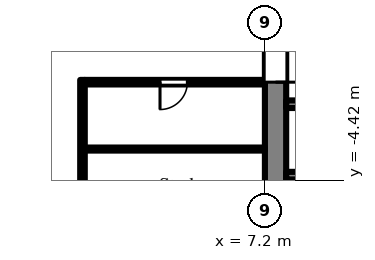
"""IFC4 building model, lengths in metres.
Left out: names, types, materials, properties, quantities, classifications, styles, units other than length and angle.
Written with IfcOpenShell. Run it as: python <this file> out.ifc"""

import sys

from ifc_helpers import new_model, si_unit, direction, frame, frame_2d, origin, place, context, subcontext, project, spatial, rectangle, extrude, element, fill, save


model = new_model("IFC4")
c1 = context("Model", 3, precision=1e-05, world=origin(), true_north=direction((0.0, 1.0)))
c2 = subcontext(c1, "Body", "Model", "MODEL_VIEW")
j1 = project(units=[si_unit("LENGTHUNIT", "METRE"), si_unit("PLANEANGLEUNIT", "RADIAN")], contexts=[c1])
p1 = place(None, origin())
s1 = spatial("IfcSite", under=j1, at=p1, CompositionType="ELEMENT")
p2 = place(p1, origin())
s2 = spatial("IfcBuilding", under=s1, at=p2, CompositionType="ELEMENT")
p3 = place(p2, frame((0.0, 0.0, 44.7)))
s3 = spatial("IfcBuildingStorey", under=s2, at=p3, CompositionType="ELEMENT", Elevation=44.7)
p4 = place(p3, frame((7.55, -7.2, 0.0), z_axis=(0.0, 0.0, 1.0), x_axis=(0.0, 1.0, 0.0)))
e1 = element("IfcWall", 1, at=p4, inside=s3, PredefinedType="SHEAR", context=c2, shape_type="SweptSolid", body=[
    extrude(rectangle(XDim=14.4, YDim=0.7, at=frame_2d((7.2, 0.0))), origin(), (0.0, 0.0, 1.0), 2.575),
])
p5 = place(p4, frame((6.0, 0.0, 0.0)))
e2 = element("IfcOpeningElement", 2, at=p5, cuts=e1, PredefinedType="OPENING", context=c2, shape_type="SweptSolid", body=[
    extrude(rectangle(XDim=2.4, YDim=2.2, at=frame_2d((1.2, 1.1))), frame((0.0, 0.36, 0.0), z_axis=(0.0, -1.0, 0.0), x_axis=(1.0, 0.0, 0.0)), (0.0, 0.0, 1.0), 0.72),
])
p6 = place(p3, frame((7.9, -1.925, 0.0), z_axis=(0.0, 0.0, 1.0), x_axis=(1.0, 0.0, 0.0)))
e3 = element("IfcWall", 3, at=p6, inside=s3, PredefinedType="SHEAR", context=c2, shape_type="SweptSolid", body=[
    extrude(rectangle(XDim=12.95, YDim=0.25, at=frame_2d((6.475, 0.0))), origin(), (0.0, 0.0, 1.0), 2.575),
])
p7 = place(p6, frame((4.825, 0.0, 0.0)))
e4 = element("IfcOpeningElement", 4, at=p7, cuts=e3, PredefinedType="OPENING", context=c2, shape_type="SweptSolid", body=[
    extrude(rectangle(XDim=1.1, YDim=2.1, at=frame_2d((0.55, 1.05))), frame((0.0, 0.135, 0.0), z_axis=(0.0, -1.0, 0.0), x_axis=(1.0, 0.0, 0.0)), (0.0, 0.0, 1.0), 0.27),
])
p8 = place(p6, frame((7.025, 0.0, 0.0)))
e5 = element("IfcOpeningElement", 5, at=p8, cuts=e3, PredefinedType="OPENING", context=c2, shape_type="SweptSolid", body=[
    extrude(rectangle(XDim=1.1, YDim=2.1, at=frame_2d((0.55, 1.05))), frame((0.0, 0.135, 0.0), z_axis=(0.0, -1.0, 0.0), x_axis=(1.0, 0.0, 0.0)), (0.0, 0.0, 1.0), 0.27),
])
p9 = place(p6, frame((9.225, 0.0, 0.0)))
e6 = element("IfcOpeningElement", 6, at=p9, cuts=e3, PredefinedType="OPENING", context=c2, shape_type="SweptSolid", body=[
    extrude(rectangle(XDim=1.1, YDim=2.1, at=frame_2d((0.55, 1.05))), frame((0.0, 0.135, 0.0), z_axis=(0.0, -1.0, 0.0), x_axis=(1.0, 0.0, 0.0)), (0.0, 0.0, 1.0), 0.27),
])
p10 = place(p6, frame((0.525, 0.0, 0.0)))
e7 = element("IfcOpeningElement", 7, at=p10, cuts=e3, PredefinedType="OPENING", context=c2, shape_type="SweptSolid", body=[
    extrude(rectangle(XDim=0.9, YDim=2.1, at=frame_2d((0.45, 1.05))), frame((0.0, 0.135, 0.0), z_axis=(0.0, -1.0, 0.0), x_axis=(1.0, 0.0, 0.0)), (0.0, 0.0, 1.0), 0.27),
])
p11 = place(p6, frame((2.625, 0.0, 0.0)))
e8 = element("IfcOpeningElement", 8, at=p11, cuts=e3, PredefinedType="OPENING", context=c2, shape_type="SweptSolid", body=[
    extrude(rectangle(XDim=1.1, YDim=2.1, at=frame_2d((0.55, 1.05))), frame((0.0, 0.135, 0.0), z_axis=(0.0, -1.0, 0.0), x_axis=(1.0, 0.0, 0.0)), (0.0, 0.0, 1.0), 0.27),
])
p12 = place(p3, frame((7.9, -4.275, 0.0), z_axis=(0.0, 0.0, 1.0), x_axis=(1.0, 0.0, 0.0)))
e9 = element("IfcWall", 9, at=p12, inside=s3, PredefinedType="SHEAR", context=c2, shape_type="SweptSolid", body=[
    extrude(rectangle(XDim=1.95, YDim=0.25, at=frame_2d((0.975, 0.0))), origin(), (0.0, 0.0, 1.0), 2.575),
])
p13 = place(p3, frame((1.2, -36.5, 0.0), z_axis=(0.0, 0.0, 1.0), x_axis=(0.0, 1.0, 0.0)))
e10 = element("IfcWall", 10, at=p13, inside=s3, PredefinedType="PARTITIONING", context=c2, shape_type="SweptSolid", body=[
    extrude(rectangle(XDim=35.375, YDim=0.15, at=frame_2d((17.688, 0.0))), origin(), (0.0, 0.0, 1.0), 2.575),
])
p14 = place(p13, frame((30.75, 0.0, 0.0)))
e11 = element("IfcOpeningElement", 11, at=p14, cuts=e10, PredefinedType="OPENING", context=c2, shape_type="SweptSolid", body=[
    extrude(rectangle(XDim=0.9, YDim=2.1, at=frame_2d((0.45, 1.05))), frame((0.0, 0.085, 0.0), z_axis=(0.0, -1.0, 0.0), x_axis=(1.0, 0.0, 0.0)), (0.0, 0.0, 1.0), 0.17),
])
p15 = place(p13, frame((23.45, 0.0, 0.0)))
e12 = element("IfcOpeningElement", 12, at=p15, cuts=e10, PredefinedType="OPENING", context=c2, shape_type="SweptSolid", body=[
    extrude(rectangle(XDim=0.9, YDim=2.1, at=frame_2d((0.45, 1.05))), frame((0.0, 0.085, 0.0), z_axis=(0.0, -1.0, 0.0), x_axis=(1.0, 0.0, 0.0)), (0.0, 0.0, 1.0), 0.17),
])
p16 = place(p13, frame((19.85, 0.0, 0.0)))
e13 = element("IfcOpeningElement", 13, at=p16, cuts=e10, PredefinedType="OPENING", context=c2, shape_type="SweptSolid", body=[
    extrude(rectangle(XDim=0.9, YDim=2.1, at=frame_2d((0.45, 1.05))), frame((0.0, 0.085, 0.0), z_axis=(0.0, -1.0, 0.0), x_axis=(1.0, 0.0, 0.0)), (0.0, 0.0, 1.0), 0.17),
])
p17 = place(p13, frame((1.55, 0.0, 0.0)))
e14 = element("IfcOpeningElement", 14, at=p17, cuts=e10, PredefinedType="OPENING", context=c2, shape_type="SweptSolid", body=[
    extrude(rectangle(XDim=1.0, YDim=2.1, at=frame_2d((0.5, 1.05))), frame((0.0, 0.085, 0.0), z_axis=(0.0, -1.0, 0.0), x_axis=(1.0, 0.0, 0.0)), (0.0, 0.0, 1.0), 0.17),
])
p18 = place(p3, frame((1.275, -3.4, 0.0), z_axis=(0.0, 0.0, 1.0), x_axis=(1.0, 0.0, 0.0)))
e15 = element("IfcWall", 15, at=p18, inside=s3, PredefinedType="PARTITIONING", context=c2, shape_type="SweptSolid", body=[
    extrude(rectangle(XDim=5.925, YDim=0.1, at=frame_2d((2.962, 0.0))), origin(), (0.0, 0.0, 1.0), 2.575),
])
p19 = place(p3, frame((1.275, -1.2, 0.0), z_axis=(0.0, 0.0, 1.0), x_axis=(1.0, 0.0, 0.0)))
e16 = element("IfcWall", 16, at=p19, inside=s3, PredefinedType="PARTITIONING", context=c2, shape_type="SweptSolid", body=[
    extrude(rectangle(XDim=5.925, YDim=0.15, at=frame_2d((2.962, 0.0))), origin(), (0.0, 0.0, 1.0), 2.575),
])
p20 = place(p19, frame((2.475, 0.0, 0.0)))
e17 = element("IfcOpeningElement", 17, at=p20, cuts=e16, PredefinedType="OPENING", context=c2, shape_type="SweptSolid", body=[
    extrude(rectangle(XDim=0.9, YDim=2.1, at=frame_2d((0.45, 1.05))), frame((0.0, 0.085, 0.0), z_axis=(0.0, -1.0, 0.0), x_axis=(1.0, 0.0, 0.0)), (0.0, 0.0, 1.0), 0.17),
])
p21 = place(p5, frame((2.4, 0.0, 0.0), z_axis=(0.0, 0.0, 1.0), x_axis=(-1.0, 0.0, 0.0)))
e18 = element("IfcDoor", 18, at=p21, inside=s3, OperationType="DOUBLE_DOOR_DOUBLE_SWING", PredefinedType="DOOR", context=c2, shape_type="SweptSolid", body=[
    extrude(rectangle(XDim=2.4, YDim=2.2, at=frame_2d((1.2, 1.1))), frame((0.0, 0.025, 0.0), z_axis=(0.0, -1.0, 0.0), x_axis=(1.0, 0.0, 0.0)), (0.0, 0.0, 1.0), 0.05),
])
fill(e2, e18)
p22 = place(p20, frame((0.9, 0.0, 0.0), z_axis=(0.0, 0.0, 1.0), x_axis=(-1.0, 0.0, 0.0)))
e19 = element("IfcDoor", 19, at=p22, inside=s3, OperationType="SINGLE_SWING_RIGHT", PredefinedType="DOOR", context=c2, shape_type="SweptSolid", body=[
    extrude(rectangle(XDim=0.9, YDim=2.1, at=frame_2d((0.45, 1.05))), frame((0.0, 0.025, 0.0), z_axis=(0.0, -1.0, 0.0), x_axis=(1.0, 0.0, 0.0)), (0.0, 0.0, 1.0), 0.05),
])
fill(e17, e19)
save(model, sys.argv[1])
